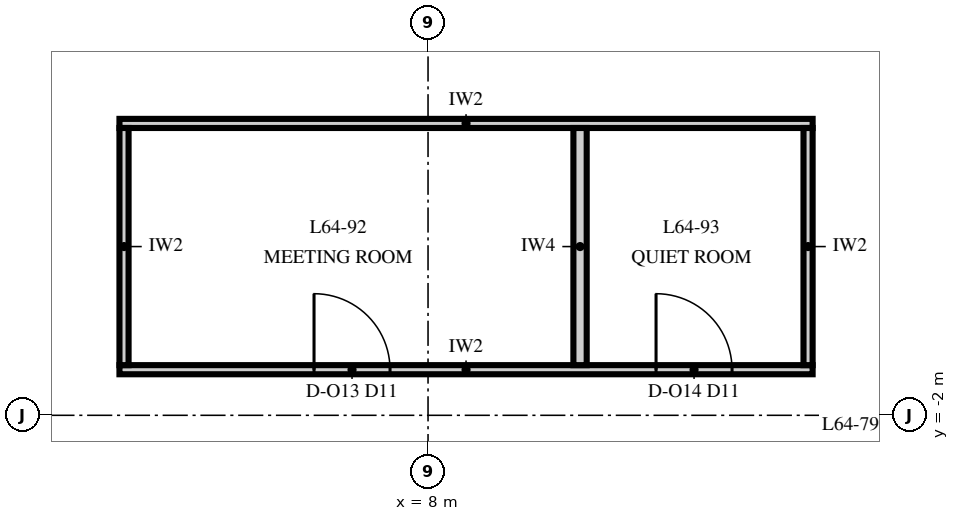
"""IFC4 building model, lengths in metres.
Left out: names, types, materials, properties, quantities, classifications, styles, units other than length and angle.
Written with IfcOpenShell. Run it as: python <this file> out.ifc"""

import sys

from ifc_helpers import new_model, si_unit, direction, frame, frame_2d, origin, place, context, subcontext, project, spatial, rectangle, extrude, element, fill, save


model = new_model("IFC4")
c1 = context("Model", 3, precision=1e-05, world=origin(), true_north=direction((0.0, 1.0)))
c2 = subcontext(c1, "Body", "Model", "MODEL_VIEW")
j1 = project(units=[si_unit("LENGTHUNIT", "METRE"), si_unit("PLANEANGLEUNIT", "RADIAN")], contexts=[c1])
p1 = place(None, origin())
s1 = spatial("IfcSite", under=j1, at=p1, CompositionType="ELEMENT")
p2 = place(p1, origin())
s2 = spatial("IfcBuilding", under=s1, at=p2, CompositionType="ELEMENT")
p3 = place(p2, frame((0.0, 0.0, 276.0)))
s3 = spatial("IfcBuildingStorey", under=s2, at=p3, CompositionType="ELEMENT", Elevation=276.0)
p4 = place(p3, frame((3.94, -1.4, 0.0), z_axis=(0.0, 0.0, 1.0), x_axis=(1.0, 0.0, 0.0)))
e1 = element("IfcWall", 1, at=p4, inside=s3, PredefinedType="PARTITIONING", context=c2, shape_type="SweptSolid", body=[
    extrude(rectangle(XDim=9.12, YDim=0.12, at=frame_2d((4.56, 0.0))), origin(), (0.0, 0.0, 1.0), 3.23),
])
p5 = place(p4, frame((2.56, 0.0, 0.0)))
e2 = element("IfcOpeningElement", 2, at=p5, cuts=e1, PredefinedType="OPENING", context=c2, shape_type="SweptSolid", body=[
    extrude(rectangle(XDim=1.0, YDim=2.4, at=frame_2d((0.5, 1.2))), frame((0.0, 0.075, 0.0), z_axis=(0.0, -1.0, 0.0), x_axis=(1.0, 0.0, 0.0)), (0.0, 0.0, 1.0), 0.15),
])
p6 = place(p4, frame((7.06, 0.0, 0.0)))
e3 = element("IfcOpeningElement", 3, at=p6, cuts=e1, PredefinedType="OPENING", context=c2, shape_type="SweptSolid", body=[
    extrude(rectangle(XDim=1.0, YDim=2.4, at=frame_2d((0.5, 1.2))), frame((0.0, 0.075, 0.0), z_axis=(0.0, -1.0, 0.0), x_axis=(1.0, 0.0, 0.0)), (0.0, 0.0, 1.0), 0.15),
])
p7 = place(p3, frame((3.94, 1.84, 0.0), z_axis=(0.0, 0.0, 1.0), x_axis=(1.0, 0.0, 0.0)))
e4 = element("IfcWall", 4, at=p7, inside=s3, PredefinedType="PARTITIONING", context=c2, shape_type="SweptSolid", body=[
    extrude(rectangle(XDim=9.12, YDim=0.12, at=frame_2d((4.56, 0.0))), origin(), (0.0, 0.0, 1.0), 3.23),
])
p8 = place(p3, frame((4.0, -1.34, 0.0), z_axis=(0.0, 0.0, 1.0), x_axis=(0.0, 1.0, 0.0)))
e5 = element("IfcWall", 5, at=p8, inside=s3, PredefinedType="PARTITIONING", context=c2, shape_type="SweptSolid", body=[
    extrude(rectangle(XDim=3.12, YDim=0.12, at=frame_2d((1.56, 0.0))), origin(), (0.0, 0.0, 1.0), 3.85),
])
p9 = place(p3, frame((10.0, -1.34, 0.0), z_axis=(0.0, 0.0, 1.0), x_axis=(0.0, 1.0, 0.0)))
e6 = element("IfcWall", 6, at=p9, inside=s3, PredefinedType="PARTITIONING", context=c2, shape_type="SweptSolid", body=[
    extrude(rectangle(XDim=3.12, YDim=0.175, at=frame_2d((1.56, 0.0))), origin(), (0.0, 0.0, 1.0), 3.85),
])
p10 = place(p3, frame((13.0, -1.34, 0.0), z_axis=(0.0, 0.0, 1.0), x_axis=(0.0, 1.0, 0.0)))
e7 = element("IfcWall", 7, at=p10, inside=s3, PredefinedType="PARTITIONING", context=c2, shape_type="SweptSolid", body=[
    extrude(rectangle(XDim=3.12, YDim=0.12, at=frame_2d((1.56, 0.0))), origin(), (0.0, 0.0, 1.0), 3.85),
])
p11 = place(p5, origin())
e8 = element("IfcDoor", 8, at=p11, inside=s3, OperationType="SINGLE_SWING_RIGHT", PredefinedType="DOOR", context=c2, shape_type="SweptSolid", body=[
    extrude(rectangle(XDim=1.0, YDim=2.4, at=frame_2d((0.5, 1.2))), frame((0.0, 0.06, 0.0), z_axis=(0.0, -1.0, 0.0), x_axis=(1.0, 0.0, 0.0)), (0.0, 0.0, 1.0), 0.12),
])
fill(e2, e8)
p12 = place(p6, origin())
e9 = element("IfcDoor", 9, at=p12, inside=s3, OperationType="SINGLE_SWING_RIGHT", PredefinedType="DOOR", context=c2, shape_type="SweptSolid", body=[
    extrude(rectangle(XDim=1.0, YDim=2.4, at=frame_2d((0.5, 1.2))), frame((0.0, 0.06, 0.0), z_axis=(0.0, -1.0, 0.0), x_axis=(1.0, 0.0, 0.0)), (0.0, 0.0, 1.0), 0.12),
])
fill(e3, e9)
save(model, sys.argv[1])
